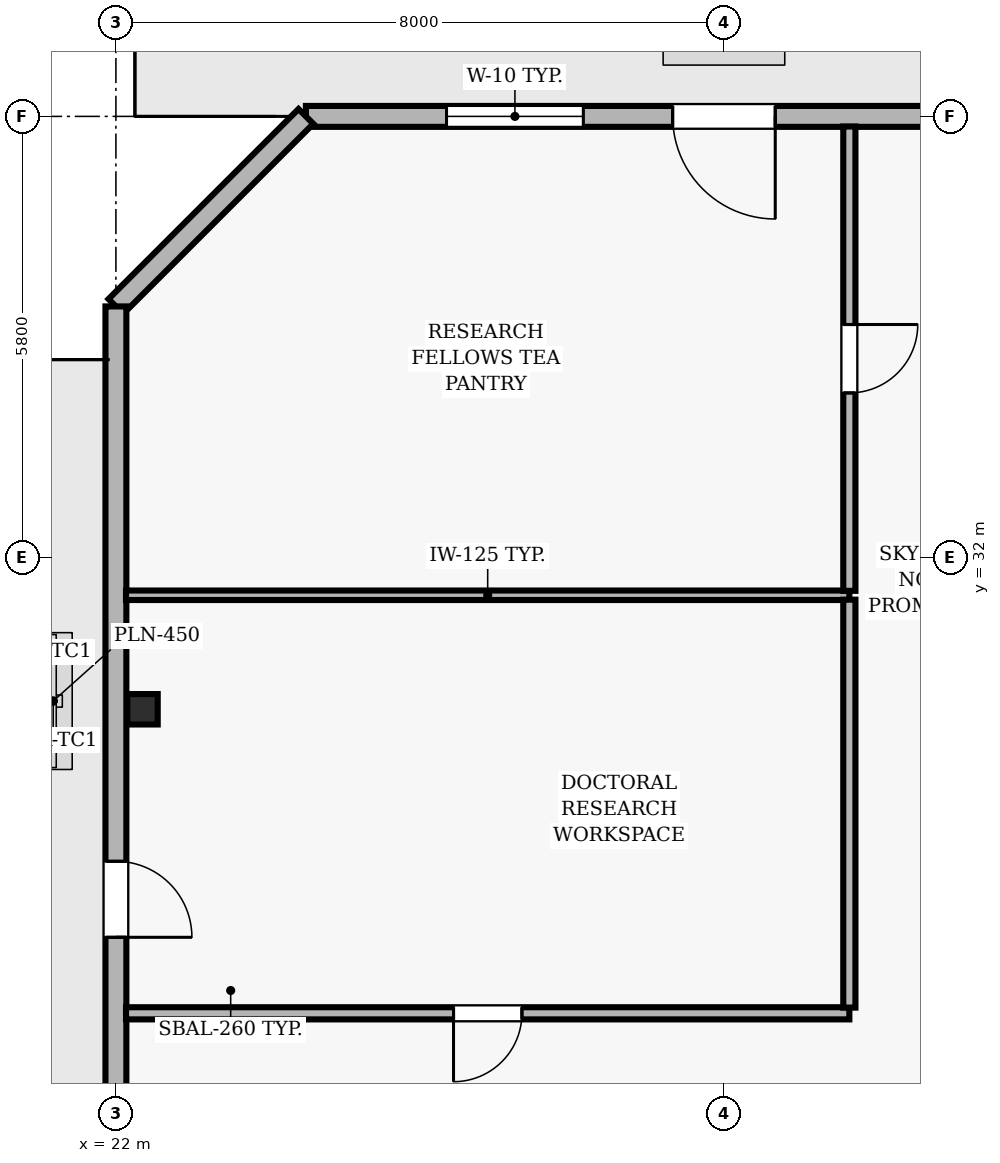
"""IFC4 building model, lengths in metres.
Left out: names, types, materials, properties, quantities, classifications, styles, units other than length and angle.
Written with IfcOpenShell. Run it as: python <this file> out.ifc"""

import sys

from ifc_helpers import new_model, si_unit, direction, frame, frame_2d, origin, origin_2d, place, context, subcontext, project, spatial, rectangle, hollow_rectangle, extrude, element, fill, save


model = new_model("IFC4")
c1 = context("Model", 3, precision=1e-05, world=origin(), true_north=direction((0.0, 1.0)))
c2 = subcontext(c1, "Body", "Model", "MODEL_VIEW")
j1 = project(units=[si_unit("LENGTHUNIT", "METRE"), si_unit("PLANEANGLEUNIT", "RADIAN")], contexts=[c1])
p1 = place(None, origin())
s1 = spatial("IfcSite", under=j1, at=p1, CompositionType="ELEMENT")
p2 = place(p1, origin())
s2 = spatial("IfcBuilding", under=s1, at=p2, CompositionType="ELEMENT")
p3 = place(p2, frame((0.0, 0.0, 243.2)))
s3 = spatial("IfcBuildingStorey", under=s2, at=p3, CompositionType="ELEMENT", Elevation=243.2)
p4 = place(p3, frame((22.35, 30.0, 0.0), z_axis=(0.0, 0.0, 1.0), x_axis=(1.0, 0.0, 0.0)))
e1 = element("IfcColumn", 1, at=p4, inside=s3, PredefinedType="COLUMN", context=c2, shape_type="SweptSolid", body=[
    extrude(hollow_rectangle(XDim=0.4, YDim=0.4, WallThickness=0.02, at=origin_2d()), origin(), (0.0, 0.0, 1.0), 5.0),
])
p5 = place(p3, frame((35.5, 37.8, 0.0), z_axis=(0.0, 0.0, 1.0), x_axis=(-1.0, 0.0, 0.0)))
e2 = element("IfcWall", 2, at=p5, inside=s3, PredefinedType="SOLIDWALL", context=c2, shape_type="SweptSolid", body=[
    extrude(rectangle(XDim=11.0, YDim=0.275, at=frame_2d((5.5, 0.0))), origin(), (0.0, 0.0, 1.0), 4.79),
])
p6 = place(p5, frame((4.825, 0.0, 0.0)))
e3 = element("IfcOpeningElement", 3, at=p6, cuts=e2, PredefinedType="OPENING", context=c2, shape_type="SweptSolid", body=[
    extrude(rectangle(XDim=1.35, YDim=2.2, at=frame_2d((0.675, 1.1))), frame((0.0, 0.147, 0.0), z_axis=(0.0, -1.0, 0.0), x_axis=(1.0, 0.0, 0.0)), (0.0, 0.0, 1.0), 0.295),
])
p7 = place(p5, frame((7.35, 0.0, 0.9)))
e4 = element("IfcOpeningElement", 4, at=p7, cuts=e2, PredefinedType="OPENING", context=c2, shape_type="SweptSolid", body=[
    extrude(rectangle(XDim=1.8, YDim=2.2, at=frame_2d((0.9, 1.1))), frame((0.0, 0.147, 0.0), z_axis=(0.0, -1.0, 0.0), x_axis=(1.0, 0.0, 0.0)), (0.0, 0.0, 1.0), 0.295),
])
p8 = place(p3, frame((24.5, 37.8, 0.0), z_axis=(0.0, 0.0, 1.0), x_axis=(-0.707106781187, -0.707106781187, 0.0)))
e5 = element("IfcWall", 5, at=p8, inside=s3, PredefinedType="SOLIDWALL", context=c2, shape_type="SweptSolid", body=[
    extrude(rectangle(XDim=3.536, YDim=0.275, at=frame_2d((1.768, 0.0))), origin(), (0.0, 0.0, 1.0), 4.79),
])
p9 = place(p3, frame((22.0, 35.3, 0.0), z_axis=(0.0, 0.0, 1.0), x_axis=(0.0, -1.0, 0.0)))
e6 = element("IfcWall", 6, at=p9, inside=s3, PredefinedType="SOLIDWALL", context=c2, shape_type="SweptSolid", body=[
    extrude(rectangle(XDim=32.8, YDim=0.275, at=frame_2d((16.4, 0.0))), origin(), (0.0, 0.0, 1.0), 4.79),
])
p10 = place(p9, frame((7.3, 0.0, 0.0)))
e7 = element("IfcOpeningElement", 7, at=p10, cuts=e6, PredefinedType="OPENING", context=c2, shape_type="SweptSolid", body=[
    extrude(rectangle(XDim=1.0, YDim=2.2, at=frame_2d((0.5, 1.1))), frame((0.0, 0.147, 0.0), z_axis=(0.0, -1.0, 0.0), x_axis=(1.0, 0.0, 0.0)), (0.0, 0.0, 1.0), 0.295),
])
p11 = place(p9, frame((12.617, 0.0, 0.9)))
e8 = element("IfcOpeningElement", 8, at=p11, cuts=e6, PredefinedType="OPENING", context=c2, shape_type="SweptSolid", body=[
    extrude(rectangle(XDim=3.0, YDim=2.2, at=frame_2d((1.5, 1.1))), frame((0.0, 0.147, 0.0), z_axis=(0.0, -1.0, 0.0), x_axis=(1.0, 0.0, 0.0)), (0.0, 0.0, 1.0), 0.295),
])
p12 = place(p9, frame((23.1, 0.0, 0.9)))
e9 = element("IfcOpeningElement", 9, at=p12, cuts=e6, PredefinedType="OPENING", context=c2, shape_type="SweptSolid", body=[
    extrude(rectangle(XDim=3.0, YDim=2.2, at=frame_2d((1.5, 1.1))), frame((0.0, 0.147, 0.0), z_axis=(0.0, -1.0, 0.0), x_axis=(1.0, 0.0, 0.0)), (0.0, 0.0, 1.0), 0.295),
])
p13 = place(p3, frame((31.65, 26.0, 0.0), z_axis=(0.0, 0.0, 1.0), x_axis=(-1.0, 0.0, 0.0)))
e10 = element("IfcWall", 10, at=p13, inside=s3, PredefinedType="PARTITIONING", context=c2, shape_type="SweptSolid", body=[
    extrude(rectangle(XDim=9.517, YDim=0.16, at=frame_2d((4.758, 0.0))), origin(), (0.0, 0.0, 1.0), 4.79),
])
p14 = place(p13, frame((4.308, 0.0, 0.0)))
e11 = element("IfcOpeningElement", 11, at=p14, cuts=e10, PredefinedType="OPENING", context=c2, shape_type="SweptSolid", body=[
    extrude(rectangle(XDim=0.9, YDim=2.1, at=frame_2d((0.45, 1.05))), frame((0.0, 0.09, 0.0), z_axis=(0.0, -1.0, 0.0), x_axis=(1.0, 0.0, 0.0)), (0.0, 0.0, 1.0), 0.18),
])
p15 = place(p3, frame((31.65, 31.5, 0.0), z_axis=(0.0, 0.0, 1.0), x_axis=(-1.0, 0.0, 0.0)))
e12 = element("IfcWall", 12, at=p15, inside=s3, PredefinedType="PARTITIONING", context=c2, shape_type="SweptSolid", body=[
    extrude(rectangle(XDim=9.517, YDim=0.125, at=frame_2d((4.758, 0.0))), origin(), (0.0, 0.0, 1.0), 4.79),
])
p16 = place(p3, frame((31.65, 31.442, 0.0), z_axis=(0.0, 0.0, 1.0), x_axis=(0.0, -1.0, 0.0)))
e13 = element("IfcWall", 13, at=p16, inside=s3, PredefinedType="PARTITIONING", context=c2, shape_type="SweptSolid", body=[
    extrude(rectangle(XDim=5.367, YDim=0.16, at=frame_2d((2.684, 0.0))), origin(), (0.0, 0.0, 1.0), 4.79),
])
p17 = place(p3, frame((31.65, 37.667, 0.0), z_axis=(0.0, 0.0, 1.0), x_axis=(0.0, -1.0, 0.0)))
e14 = element("IfcWall", 14, at=p17, inside=s3, PredefinedType="PARTITIONING", context=c2, shape_type="SweptSolid", body=[
    extrude(rectangle(XDim=6.109, YDim=0.16, at=frame_2d((3.054, 0.0))), origin(), (0.0, 0.0, 1.0), 4.79),
])
p18 = place(p17, frame((2.605, 0.0, 0.0)))
e15 = element("IfcOpeningElement", 15, at=p18, cuts=e14, PredefinedType="OPENING", context=c2, shape_type="SweptSolid", body=[
    extrude(rectangle(XDim=0.9, YDim=2.1, at=frame_2d((0.45, 1.05))), frame((0.0, 0.09, 0.0), z_axis=(0.0, -1.0, 0.0), x_axis=(1.0, 0.0, 0.0)), (0.0, 0.0, 1.0), 0.18),
])
p19 = place(p6, origin())
e16 = element("IfcDoor", 16, at=p19, inside=s3, OperationType="SINGLE_SWING_LEFT", PredefinedType="DOOR", context=c2, shape_type="SweptSolid", body=[
    extrude(rectangle(XDim=1.35, YDim=2.2, at=frame_2d((0.675, 1.1))), frame((0.0, 0.025, 0.0), z_axis=(0.0, -1.0, 0.0), x_axis=(1.0, 0.0, 0.0)), (0.0, 0.0, 1.0), 0.05),
])
fill(e3, e16)
p20 = place(p7, origin())
e17 = element("IfcWindow", 17, at=p20, inside=s3, PartitioningType="SINGLE_PANEL", PredefinedType="WINDOW", context=c2, shape_type="SweptSolid", body=[
    extrude(rectangle(XDim=1.8, YDim=2.2, at=frame_2d((0.9, 1.1))), frame((0.0, 0.03, 0.0), z_axis=(0.0, -1.0, 0.0), x_axis=(1.0, 0.0, 0.0)), (0.0, 0.0, 1.0), 0.06),
])
fill(e4, e17)
p21 = place(p10, origin())
e18 = element("IfcDoor", 18, at=p21, inside=s3, OperationType="SINGLE_SWING_RIGHT", PredefinedType="DOOR", context=c2, shape_type="SweptSolid", body=[
    extrude(rectangle(XDim=1.0, YDim=2.2, at=frame_2d((0.5, 1.1))), frame((0.0, 0.025, 0.0), z_axis=(0.0, -1.0, 0.0), x_axis=(1.0, 0.0, 0.0)), (0.0, 0.0, 1.0), 0.05),
])
fill(e7, e18)
p22 = place(p14, origin())
e19 = element("IfcDoor", 19, at=p22, inside=s3, OperationType="SINGLE_SWING_RIGHT", PredefinedType="DOOR", context=c2, shape_type="SweptSolid", body=[
    extrude(rectangle(XDim=0.9, YDim=2.1, at=frame_2d((0.45, 1.05))), frame((0.0, 0.025, 0.0), z_axis=(0.0, -1.0, 0.0), x_axis=(1.0, 0.0, 0.0)), (0.0, 0.0, 1.0), 0.05),
])
fill(e11, e19)
p23 = place(p18, origin())
e20 = element("IfcDoor", 20, at=p23, inside=s3, OperationType="SINGLE_SWING_LEFT", PredefinedType="DOOR", context=c2, shape_type="SweptSolid", body=[
    extrude(rectangle(XDim=0.9, YDim=2.1, at=frame_2d((0.45, 1.05))), frame((0.0, 0.025, 0.0), z_axis=(0.0, -1.0, 0.0), x_axis=(1.0, 0.0, 0.0)), (0.0, 0.0, 1.0), 0.05),
])
fill(e15, e20)
save(model, sys.argv[1])
